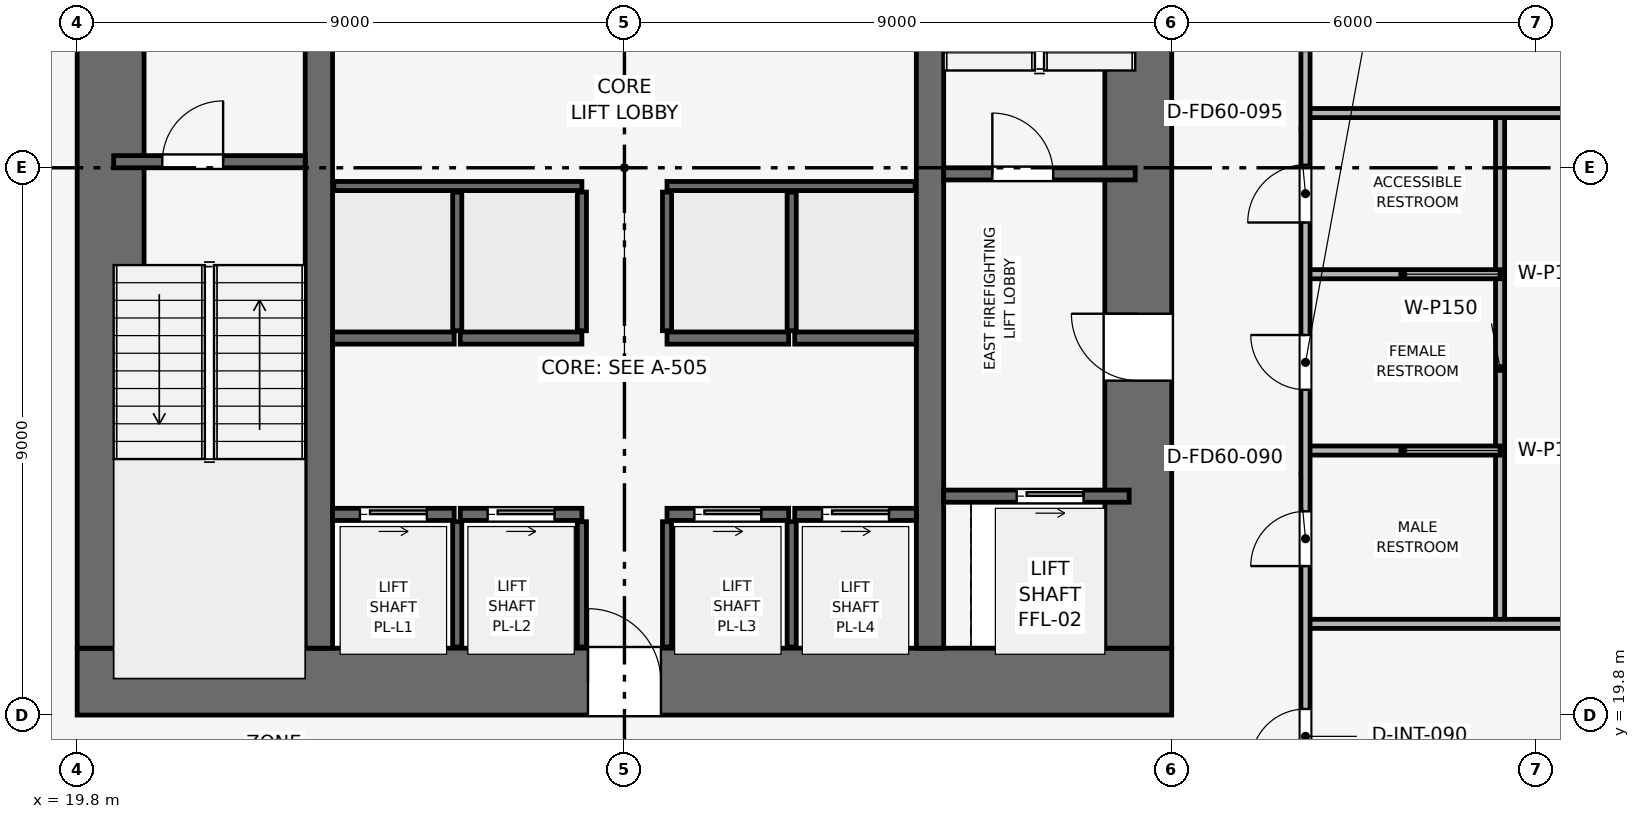
"""IFC4 building model, lengths in metres.
Left out: names, types, materials, properties, quantities, classifications, styles, units other than length and angle.
Written with IfcOpenShell. Run it as: python <this file> out.ifc"""

import sys

from ifc_helpers import new_model, si_unit, direction, frame, frame_2d, origin, place, context, subcontext, project, spatial, rectangle, extrude, element, fill, save


model = new_model("IFC4")
c1 = context("Model", 3, precision=1e-05, world=origin(), true_north=direction((0.0, 1.0)))
c2 = subcontext(c1, "Body", "Model", "MODEL_VIEW")
j1 = project(units=[si_unit("LENGTHUNIT", "METRE"), si_unit("PLANEANGLEUNIT", "RADIAN")], contexts=[c1])
p1 = place(None, origin())
s1 = spatial("IfcSite", under=j1, at=p1, CompositionType="ELEMENT")
p2 = place(p1, origin())
s2 = spatial("IfcBuilding", under=s1, at=p2, CompositionType="ELEMENT")
p3 = place(p2, frame((0.0, 0.0, 72.9)))
s3 = spatial("IfcBuildingStorey", under=s2, at=p3, CompositionType="ELEMENT", Elevation=72.9)
p4 = place(p3, frame((19.8, 20.35, 0.0), z_axis=(0.0, 0.0, 1.0), x_axis=(1.0, 0.0, 0.0)))
e1 = element("IfcWall", 1, at=p4, inside=s3, PredefinedType="SHEAR", context=c2, shape_type="SweptSolid", body=[
    extrude(rectangle(XDim=18.0, YDim=1.1, at=frame_2d((9.0, 0.0))), origin(), (0.0, 0.0, 1.0), 3.9),
])
p5 = place(p4, frame((8.4, 0.0, 0.0)))
e2 = element("IfcOpeningElement", 2, at=p5, cuts=e1, PredefinedType="OPENING", context=c2, shape_type="SweptSolid", body=[
    extrude(rectangle(XDim=1.2, YDim=2.2, at=frame_2d((0.6, 1.1))), frame((0.0, 0.56, 0.0), z_axis=(0.0, -1.0, 0.0), x_axis=(1.0, 0.0, 0.0)), (0.0, 0.0, 1.0), 1.12),
])
p6 = place(p3, frame((20.35, 20.9, 0.0), z_axis=(0.0, 0.0, 1.0), x_axis=(0.0, 1.0, 0.0)))
e3 = element("IfcWall", 3, at=p6, inside=s3, PredefinedType="SHEAR", context=c2, shape_type="SweptSolid", body=[
    extrude(rectangle(XDim=15.8, YDim=1.1, at=frame_2d((7.9, 0.0))), origin(), (0.0, 0.0, 1.0), 3.9),
])
p7 = place(p6, frame((9.9, 0.0, 0.0)))
e4 = element("IfcOpeningElement", 4, at=p7, cuts=e3, PredefinedType="OPENING", context=c2, shape_type="SweptSolid", body=[
    extrude(rectangle(XDim=1.1, YDim=2.15, at=frame_2d((0.55, 1.075))), frame((0.0, 0.56, 0.0), z_axis=(0.0, -1.0, 0.0), x_axis=(1.0, 0.0, 0.0)), (0.0, 0.0, 1.0), 1.12),
])
p8 = place(p3, frame((37.25, 20.9, 0.0), z_axis=(0.0, 0.0, 1.0), x_axis=(0.0, 1.0, 0.0)))
e5 = element("IfcWall", 5, at=p8, inside=s3, PredefinedType="SHEAR", context=c2, shape_type="SweptSolid", body=[
    extrude(rectangle(XDim=15.8, YDim=1.1, at=frame_2d((7.9, 0.0))), origin(), (0.0, 0.0, 1.0), 3.9),
])
p9 = place(p8, frame((4.4, 0.0, 0.0)))
e6 = element("IfcOpeningElement", 6, at=p9, cuts=e5, PredefinedType="OPENING", context=c2, shape_type="SweptSolid", body=[
    extrude(rectangle(XDim=1.1, YDim=2.15, at=frame_2d((0.55, 1.075))), frame((0.0, 0.56, 0.0), z_axis=(0.0, -1.0, 0.0), x_axis=(1.0, 0.0, 0.0)), (0.0, 0.0, 1.0), 1.12),
])
for number, where, z_axis, x_axis in (
    (7, (23.775, 20.9, 0.0), (0.0, 0.0, 1.0), (0.0, 1.0, 0.0)),
    (8, (33.825, 20.9, 0.0), (0.0, 0.0, 1.0), (0.0, 1.0, 0.0)),
):
    element("IfcWall", number, at=place(p3, frame(where, z_axis=z_axis, x_axis=x_axis)), inside=s3, PredefinedType="SHEAR", context=c2, shape_type="SweptSolid", body=[
        extrude(rectangle(XDim=15.8, YDim=0.45, at=frame_2d((7.9, 0.0))), origin(), (0.0, 0.0, 1.0), 3.9),
    ])
p10 = place(p3, frame((20.4, 28.9, 0.0), z_axis=(0.0, 0.0, 1.0), x_axis=(1.0, 0.0, 0.0)))
e9 = element("IfcWall", 9, at=p10, inside=s3, PredefinedType="SHEAR", context=c2, shape_type="SweptSolid", body=[
    extrude(rectangle(XDim=3.15, YDim=0.2, at=frame_2d((1.575, 0.0))), origin(), (0.0, 0.0, 1.0), 3.65),
])
p11 = place(p10, frame((0.8, 0.0, 0.0)))
e10 = element("IfcOpeningElement", 10, at=p11, cuts=e9, PredefinedType="OPENING", context=c2, shape_type="SweptSolid", body=[
    extrude(rectangle(XDim=1.0, YDim=2.1, at=frame_2d((0.5, 1.05))), frame((0.0, 0.11, 0.0), z_axis=(0.0, -1.0, 0.0), x_axis=(1.0, 0.0, 0.0)), (0.0, 0.0, 1.0), 0.22),
])
p12 = place(p3, frame((34.05, 28.7, 0.0), z_axis=(0.0, 0.0, 1.0), x_axis=(1.0, 0.0, 0.0)))
e11 = element("IfcWall", 11, at=p12, inside=s3, PredefinedType="SHEAR", context=c2, shape_type="SweptSolid", body=[
    extrude(rectangle(XDim=3.15, YDim=0.2, at=frame_2d((1.575, 0.0))), origin(), (0.0, 0.0, 1.0), 3.65),
])
p13 = place(p12, frame((0.8, 0.0, 0.0)))
e12 = element("IfcOpeningElement", 12, at=p13, cuts=e11, PredefinedType="OPENING", context=c2, shape_type="SweptSolid", body=[
    extrude(rectangle(XDim=1.0, YDim=2.1, at=frame_2d((0.5, 1.05))), frame((0.0, 0.11, 0.0), z_axis=(0.0, -1.0, 0.0), x_axis=(1.0, 0.0, 0.0)), (0.0, 0.0, 1.0), 0.22),
])
p14 = place(p3, frame((34.05, 23.4, 0.0), z_axis=(0.0, 0.0, 1.0), x_axis=(1.0, 0.0, 0.0)))
e13 = element("IfcWall", 13, at=p14, inside=s3, PredefinedType="SHEAR", context=c2, shape_type="SweptSolid", body=[
    extrude(rectangle(XDim=3.05, YDim=0.2, at=frame_2d((1.525, 0.0))), origin(), (0.0, 0.0, 1.0), 3.65),
])
p15 = place(p14, frame((1.2, 0.0, 0.0)))
e14 = element("IfcOpeningElement", 14, at=p15, cuts=e13, PredefinedType="OPENING", context=c2, shape_type="SweptSolid", body=[
    extrude(rectangle(XDim=1.1, YDim=2.15, at=frame_2d((0.55, 1.075))), frame((0.0, 0.11, 0.0), z_axis=(0.0, -1.0, 0.0), x_axis=(1.0, 0.0, 0.0)), (0.0, 0.0, 1.0), 0.22),
])
p16 = place(p3, frame((24.0, 23.1, 0.0), z_axis=(0.0, 0.0, 1.0), x_axis=(1.0, 0.0, 0.0)))
e15 = element("IfcWall", 15, at=p16, inside=s3, PredefinedType="SHEAR", context=c2, shape_type="SweptSolid", body=[
    extrude(rectangle(XDim=2.0, YDim=0.2, at=frame_2d((1.0, 0.0))), origin(), (0.0, 0.0, 1.0), 3.65),
])
p17 = place(p16, frame((0.45, 0.0, 0.0)))
e16 = element("IfcOpeningElement", 16, at=p17, cuts=e15, PredefinedType="OPENING", context=c2, shape_type="SweptSolid", body=[
    extrude(rectangle(XDim=1.1, YDim=2.15, at=frame_2d((0.55, 1.075))), frame((0.0, 0.11, 0.0), z_axis=(0.0, -1.0, 0.0), x_axis=(1.0, 0.0, 0.0)), (0.0, 0.0, 1.0), 0.22),
])
p18 = place(p3, frame((26.1, 23.1, 0.0), z_axis=(0.0, 0.0, 1.0), x_axis=(1.0, 0.0, 0.0)))
e17 = element("IfcWall", 17, at=p18, inside=s3, PredefinedType="SHEAR", context=c2, shape_type="SweptSolid", body=[
    extrude(rectangle(XDim=2.0, YDim=0.2, at=frame_2d((1.0, 0.0))), origin(), (0.0, 0.0, 1.0), 3.65),
])
p19 = place(p18, frame((0.45, 0.0, 0.0)))
e18 = element("IfcOpeningElement", 18, at=p19, cuts=e17, PredefinedType="OPENING", context=c2, shape_type="SweptSolid", body=[
    extrude(rectangle(XDim=1.1, YDim=2.15, at=frame_2d((0.55, 1.075))), frame((0.0, 0.11, 0.0), z_axis=(0.0, -1.0, 0.0), x_axis=(1.0, 0.0, 0.0)), (0.0, 0.0, 1.0), 0.22),
])
p20 = place(p3, frame((29.5, 23.1, 0.0), z_axis=(0.0, 0.0, 1.0), x_axis=(1.0, 0.0, 0.0)))
e19 = element("IfcWall", 19, at=p20, inside=s3, PredefinedType="SHEAR", context=c2, shape_type="SweptSolid", body=[
    extrude(rectangle(XDim=2.0, YDim=0.2, at=frame_2d((1.0, 0.0))), origin(), (0.0, 0.0, 1.0), 3.65),
])
p21 = place(p20, frame((0.45, 0.0, 0.0)))
e20 = element("IfcOpeningElement", 20, at=p21, cuts=e19, PredefinedType="OPENING", context=c2, shape_type="SweptSolid", body=[
    extrude(rectangle(XDim=1.1, YDim=2.15, at=frame_2d((0.55, 1.075))), frame((0.0, 0.11, 0.0), z_axis=(0.0, -1.0, 0.0), x_axis=(1.0, 0.0, 0.0)), (0.0, 0.0, 1.0), 0.22),
])
p22 = place(p3, frame((31.6, 23.1, 0.0), z_axis=(0.0, 0.0, 1.0), x_axis=(1.0, 0.0, 0.0)))
e21 = element("IfcWall", 21, at=p22, inside=s3, PredefinedType="SHEAR", context=c2, shape_type="SweptSolid", body=[
    extrude(rectangle(XDim=2.0, YDim=0.2, at=frame_2d((1.0, 0.0))), origin(), (0.0, 0.0, 1.0), 3.65),
])
p23 = place(p22, frame((0.45, 0.0, 0.0)))
e22 = element("IfcOpeningElement", 22, at=p23, cuts=e21, PredefinedType="OPENING", context=c2, shape_type="SweptSolid", body=[
    extrude(rectangle(XDim=1.1, YDim=2.15, at=frame_2d((0.55, 1.075))), frame((0.0, 0.11, 0.0), z_axis=(0.0, -1.0, 0.0), x_axis=(1.0, 0.0, 0.0)), (0.0, 0.0, 1.0), 0.22),
])
for number, where, z_axis, x_axis in (
    (23, (24.0, 26.0, 0.0), (0.0, 0.0, 1.0), (1.0, 0.0, 0.0)),
    (24, (26.1, 26.0, 0.0), (0.0, 0.0, 1.0), (1.0, 0.0, 0.0)),
    (25, (29.5, 26.0, 0.0), (0.0, 0.0, 1.0), (1.0, 0.0, 0.0)),
    (26, (31.6, 26.0, 0.0), (0.0, 0.0, 1.0), (1.0, 0.0, 0.0)),
):
    element("IfcWall", number, at=place(p3, frame(where, z_axis=z_axis, x_axis=x_axis)), inside=s3, PredefinedType="SHEAR", context=c2, shape_type="SweptSolid", body=[
        extrude(rectangle(XDim=2.0, YDim=0.2, at=frame_2d((1.0, 0.0))), origin(), (0.0, 0.0, 1.0), 3.65),
    ])
for number, where, z_axis, x_axis in (
    (27, (26.05, 20.92, 0.0), (0.0, 0.0, 1.0), (0.0, 1.0, 0.0)),
    (28, (28.1, 20.92, 0.0), (0.0, 0.0, 1.0), (0.0, 1.0, 0.0)),
    (29, (29.5, 20.92, 0.0), (0.0, 0.0, 1.0), (0.0, 1.0, 0.0)),
    (30, (31.55, 20.92, 0.0), (0.0, 0.0, 1.0), (0.0, 1.0, 0.0)),
):
    element("IfcWall", number, at=place(p3, frame(where, z_axis=z_axis, x_axis=x_axis)), inside=s3, PredefinedType="SHEAR", context=c2, shape_type="SweptSolid", body=[
        extrude(rectangle(XDim=2.06, YDim=0.15, at=frame_2d((1.03, 0.0))), origin(), (0.0, 0.0, 1.0), 3.65),
    ])
for number, where, z_axis, x_axis in (
    (31, (24.02, 28.5, 0.0), (0.0, 0.0, 1.0), (1.0, 0.0, 0.0)),
    (32, (29.5, 28.5, 0.0), (0.0, 0.0, 1.0), (1.0, 0.0, 0.0)),
):
    element("IfcWall", number, at=place(p3, frame(where, z_axis=z_axis, x_axis=x_axis)), inside=s3, PredefinedType="SHEAR", context=c2, shape_type="SweptSolid", body=[
        extrude(rectangle(XDim=4.08, YDim=0.15, at=frame_2d((2.04, 0.0))), origin(), (0.0, 0.0, 1.0), 3.65),
    ])
for number, where, z_axis, x_axis in (
    (33, (26.05, 26.12, 0.0), (0.0, 0.0, 1.0), (0.0, 1.0, 0.0)),
    (34, (28.1, 26.12, 0.0), (0.0, 0.0, 1.0), (0.0, 1.0, 0.0)),
    (35, (29.5, 26.12, 0.0), (0.0, 0.0, 1.0), (0.0, 1.0, 0.0)),
    (36, (31.55, 26.12, 0.0), (0.0, 0.0, 1.0), (0.0, 1.0, 0.0)),
):
    element("IfcWall", number, at=place(p3, frame(where, z_axis=z_axis, x_axis=x_axis)), inside=s3, PredefinedType="SHEAR", context=c2, shape_type="SweptSolid", body=[
        extrude(rectangle(XDim=2.28, YDim=0.15, at=frame_2d((1.14, 0.0))), origin(), (0.0, 0.0, 1.0), 3.65),
    ])
p24 = place(p3, frame((43.2, 21.3, 0.0), z_axis=(0.0, 0.0, 1.0), x_axis=(0.0, 1.0, 0.0)))
e37 = element("IfcWall", 37, at=p24, inside=s3, PredefinedType="PARTITIONING", context=c2, shape_type="SweptSolid", body=[
    extrude(rectangle(XDim=8.4, YDim=0.15, at=frame_2d((4.2, 0.0))), origin(), (0.0, 0.0, 1.0), 3.085),
])
p25 = place(p3, frame((40.0, 21.3, 0.0), z_axis=(0.0, 0.0, 1.0), x_axis=(1.0, 0.0, 0.0)))
e38 = element("IfcWall", 38, at=p25, inside=s3, PredefinedType="PARTITIONING", context=c2, shape_type="SweptSolid", body=[
    extrude(rectangle(XDim=16.57, YDim=0.15, at=frame_2d((8.285, 0.0))), origin(), (0.0, 0.0, 1.0), 2.935),
])
p26 = place(p25, frame((9.435, 0.0, 0.0)))
e39 = element("IfcOpeningElement", 39, at=p26, cuts=e38, PredefinedType="OPENING", context=c2, shape_type="SweptSolid", body=[
    extrude(rectangle(XDim=0.9, YDim=2.1, at=frame_2d((0.45, 1.05))), frame((0.0, 0.085, 0.0), z_axis=(0.0, -1.0, 0.0), x_axis=(1.0, 0.0, 0.0)), (0.0, 0.0, 1.0), 0.17),
])
p27 = place(p3, frame((40.0, 29.7, 0.0), z_axis=(0.0, 0.0, 1.0), x_axis=(1.0, 0.0, 0.0)))
e40 = element("IfcWall", 40, at=p27, inside=s3, PredefinedType="PARTITIONING", context=c2, shape_type="SweptSolid", body=[
    extrude(rectangle(XDim=16.57, YDim=0.15, at=frame_2d((8.285, 0.0))), origin(), (0.0, 0.0, 1.0), 2.935),
])
for number, where, z_axis, x_axis in (
    (41, (40.0, 24.15, 0.0), (0.0, 0.0, 1.0), (1.0, 0.0, 0.0)),
    (42, (40.0, 27.05, 0.0), (0.0, 0.0, 1.0), (1.0, 0.0, 0.0)),
):
    element("IfcWall", number, at=place(p3, frame(where, z_axis=z_axis, x_axis=x_axis)), inside=s3, PredefinedType="PARTITIONING", context=c2, shape_type="SweptSolid", body=[
        extrude(rectangle(XDim=3.2, YDim=0.15, at=frame_2d((1.6, 0.0))), origin(), (0.0, 0.0, 1.0), 3.65),
    ])
p28 = place(p3, frame((40.0, 17.6, 0.0), z_axis=(0.0, 0.0, 1.0), x_axis=(0.0, 1.0, 0.0)))
e43 = element("IfcWall", 43, at=p28, inside=s3, PredefinedType="PARTITIONING", context=c2, shape_type="SweptSolid", body=[
    extrude(rectangle(XDim=22.4, YDim=0.15, at=frame_2d((11.2, 0.0))), origin(), (0.0, 0.0, 1.0), 3.085),
])
p29 = place(p28, frame((1.4, 0.0, 0.0)))
e44 = element("IfcOpeningElement", 44, at=p29, cuts=e43, PredefinedType="OPENING", context=c2, shape_type="SweptSolid", body=[
    extrude(rectangle(XDim=0.9, YDim=2.1, at=frame_2d((0.45, 1.05))), frame((0.0, 0.085, 0.0), z_axis=(0.0, -1.0, 0.0), x_axis=(1.0, 0.0, 0.0)), (0.0, 0.0, 1.0), 0.17),
])
p30 = place(p28, frame((4.65, 0.0, 0.0)))
e45 = element("IfcOpeningElement", 45, at=p30, cuts=e43, PredefinedType="OPENING", context=c2, shape_type="SweptSolid", body=[
    extrude(rectangle(XDim=0.9, YDim=2.1, at=frame_2d((0.45, 1.05))), frame((0.0, 0.085, 0.0), z_axis=(0.0, -1.0, 0.0), x_axis=(1.0, 0.0, 0.0)), (0.0, 0.0, 1.0), 0.17),
])
p31 = place(p28, frame((7.55, 0.0, 0.0)))
e46 = element("IfcOpeningElement", 46, at=p31, cuts=e43, PredefinedType="OPENING", context=c2, shape_type="SweptSolid", body=[
    extrude(rectangle(XDim=0.9, YDim=2.1, at=frame_2d((0.45, 1.05))), frame((0.0, 0.085, 0.0), z_axis=(0.0, -1.0, 0.0), x_axis=(1.0, 0.0, 0.0)), (0.0, 0.0, 1.0), 0.17),
])
p32 = place(p28, frame((10.3, 0.0, 0.0)))
e47 = element("IfcOpeningElement", 47, at=p32, cuts=e43, PredefinedType="OPENING", context=c2, shape_type="SweptSolid", body=[
    extrude(rectangle(XDim=0.95, YDim=2.1, at=frame_2d((0.475, 1.05))), frame((0.0, 0.085, 0.0), z_axis=(0.0, -1.0, 0.0), x_axis=(1.0, 0.0, 0.0)), (0.0, 0.0, 1.0), 0.17),
])
p33 = place(p28, frame((16.8, 0.0, 0.0)))
e48 = element("IfcOpeningElement", 48, at=p33, cuts=e43, PredefinedType="OPENING", context=c2, shape_type="SweptSolid", body=[
    extrude(rectangle(XDim=0.9, YDim=2.1, at=frame_2d((0.45, 1.05))), frame((0.0, 0.085, 0.0), z_axis=(0.0, -1.0, 0.0), x_axis=(1.0, 0.0, 0.0)), (0.0, 0.0, 1.0), 0.17),
])
p34 = place(p11, origin())
e49 = element("IfcDoor", 49, at=p34, inside=s3, OperationType="SINGLE_SWING_RIGHT", PredefinedType="DOOR", context=c2, shape_type="SweptSolid", body=[
    extrude(rectangle(XDim=1.0, YDim=2.1, at=frame_2d((0.5, 1.05))), frame((0.0, 0.025, 0.0), z_axis=(0.0, -1.0, 0.0), x_axis=(1.0, 0.0, 0.0)), (0.0, 0.0, 1.0), 0.05),
])
fill(e10, e49)
p35 = place(p13, origin())
e50 = element("IfcDoor", 50, at=p35, inside=s3, OperationType="SINGLE_SWING_LEFT", PredefinedType="DOOR", context=c2, shape_type="SweptSolid", body=[
    extrude(rectangle(XDim=1.0, YDim=2.1, at=frame_2d((0.5, 1.05))), frame((0.0, 0.025, 0.0), z_axis=(0.0, -1.0, 0.0), x_axis=(1.0, 0.0, 0.0)), (0.0, 0.0, 1.0), 0.05),
])
fill(e12, e50)
p36 = place(p15, origin())
e51 = element("IfcDoor", 51, at=p36, inside=s3, OperationType="SLIDING_TO_RIGHT", PredefinedType="DOOR", context=c2, shape_type="SweptSolid", body=[
    extrude(rectangle(XDim=1.1, YDim=2.15, at=frame_2d((0.55, 1.075))), frame((0.0, 0.025, 0.0), z_axis=(0.0, -1.0, 0.0), x_axis=(1.0, 0.0, 0.0)), (0.0, 0.0, 1.0), 0.05),
])
fill(e14, e51)
p37 = place(p17, origin())
e52 = element("IfcDoor", 52, at=p37, inside=s3, OperationType="SLIDING_TO_RIGHT", PredefinedType="DOOR", context=c2, shape_type="SweptSolid", body=[
    extrude(rectangle(XDim=1.1, YDim=2.15, at=frame_2d((0.55, 1.075))), frame((0.0, 0.025, 0.0), z_axis=(0.0, -1.0, 0.0), x_axis=(1.0, 0.0, 0.0)), (0.0, 0.0, 1.0), 0.05),
])
fill(e16, e52)
p38 = place(p19, origin())
e53 = element("IfcDoor", 53, at=p38, inside=s3, OperationType="SLIDING_TO_RIGHT", PredefinedType="DOOR", context=c2, shape_type="SweptSolid", body=[
    extrude(rectangle(XDim=1.1, YDim=2.15, at=frame_2d((0.55, 1.075))), frame((0.0, 0.025, 0.0), z_axis=(0.0, -1.0, 0.0), x_axis=(1.0, 0.0, 0.0)), (0.0, 0.0, 1.0), 0.05),
])
fill(e18, e53)
p39 = place(p21, origin())
e54 = element("IfcDoor", 54, at=p39, inside=s3, OperationType="SLIDING_TO_RIGHT", PredefinedType="DOOR", context=c2, shape_type="SweptSolid", body=[
    extrude(rectangle(XDim=1.1, YDim=2.15, at=frame_2d((0.55, 1.075))), frame((0.0, 0.025, 0.0), z_axis=(0.0, -1.0, 0.0), x_axis=(1.0, 0.0, 0.0)), (0.0, 0.0, 1.0), 0.05),
])
fill(e20, e54)
p40 = place(p23, origin())
e55 = element("IfcDoor", 55, at=p40, inside=s3, OperationType="SLIDING_TO_RIGHT", PredefinedType="DOOR", context=c2, shape_type="SweptSolid", body=[
    extrude(rectangle(XDim=1.1, YDim=2.15, at=frame_2d((0.55, 1.075))), frame((0.0, 0.025, 0.0), z_axis=(0.0, -1.0, 0.0), x_axis=(1.0, 0.0, 0.0)), (0.0, 0.0, 1.0), 0.05),
])
fill(e22, e55)
p41 = place(p29, origin())
e56 = element("IfcDoor", 56, at=p41, inside=s3, OperationType="SINGLE_SWING_LEFT", PredefinedType="DOOR", context=c2, shape_type="SweptSolid", body=[
    extrude(rectangle(XDim=0.9, YDim=2.1, at=frame_2d((0.45, 1.05))), frame((0.0, 0.025, 0.0), z_axis=(0.0, -1.0, 0.0), x_axis=(1.0, 0.0, 0.0)), (0.0, 0.0, 1.0), 0.05),
])
fill(e44, e56)
p42 = place(p30, origin())
e57 = element("IfcDoor", 57, at=p42, inside=s3, OperationType="SINGLE_SWING_LEFT", PredefinedType="DOOR", context=c2, shape_type="SweptSolid", body=[
    extrude(rectangle(XDim=0.9, YDim=2.1, at=frame_2d((0.45, 1.05))), frame((0.0, 0.025, 0.0), z_axis=(0.0, -1.0, 0.0), x_axis=(1.0, 0.0, 0.0)), (0.0, 0.0, 1.0), 0.05),
])
fill(e45, e57)
p43 = place(p31, origin())
e58 = element("IfcDoor", 58, at=p43, inside=s3, OperationType="SINGLE_SWING_RIGHT", PredefinedType="DOOR", context=c2, shape_type="SweptSolid", body=[
    extrude(rectangle(XDim=0.9, YDim=2.1, at=frame_2d((0.45, 1.05))), frame((0.0, 0.025, 0.0), z_axis=(0.0, -1.0, 0.0), x_axis=(1.0, 0.0, 0.0)), (0.0, 0.0, 1.0), 0.05),
])
fill(e46, e58)
p44 = place(p32, origin())
e59 = element("IfcDoor", 59, at=p44, inside=s3, OperationType="SINGLE_SWING_LEFT", PredefinedType="DOOR", context=c2, shape_type="SweptSolid", body=[
    extrude(rectangle(XDim=0.95, YDim=2.1, at=frame_2d((0.475, 1.05))), frame((0.0, 0.025, 0.0), z_axis=(0.0, -1.0, 0.0), x_axis=(1.0, 0.0, 0.0)), (0.0, 0.0, 1.0), 0.05),
])
fill(e47, e59)
p45 = place(p9, origin())
e60 = element("IfcDoor", 60, at=p45, inside=s3, OperationType="SINGLE_SWING_RIGHT", PredefinedType="DOOR", context=c2, shape_type="SweptSolid", body=[
    extrude(rectangle(XDim=1.1, YDim=2.15, at=frame_2d((0.55, 1.075))), frame((0.0, 0.025, 0.0), z_axis=(0.0, -1.0, 0.0), x_axis=(1.0, 0.0, 0.0)), (0.0, 0.0, 1.0), 0.05),
])
fill(e6, e60)
p46 = place(p5, origin())
e61 = element("IfcDoor", 61, at=p46, inside=s3, OperationType="SINGLE_SWING_LEFT", PredefinedType="DOOR", context=c2, shape_type="SweptSolid", body=[
    extrude(rectangle(XDim=1.2, YDim=2.2, at=frame_2d((0.6, 1.1))), frame((0.0, 0.025, 0.0), z_axis=(0.0, -1.0, 0.0), x_axis=(1.0, 0.0, 0.0)), (0.0, 0.0, 1.0), 0.05),
])
fill(e2, e61)
save(model, sys.argv[1])
